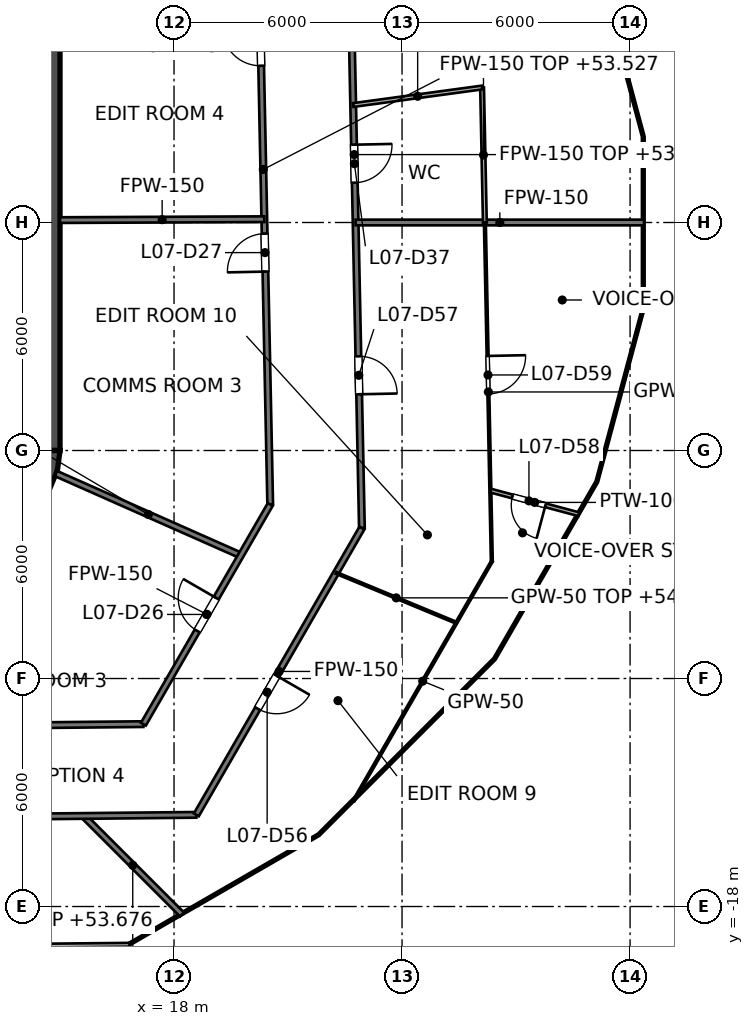
"""IFC4 building model, lengths in metres.
Left out: names, types, materials, properties, quantities, classifications, styles, units other than length and angle.
Written with IfcOpenShell. Run it as: python <this file> out.ifc"""

import sys

from ifc_helpers import new_model, si_unit, direction, frame, frame_2d, origin, place, context, subcontext, project, spatial, polyline, rectangle, outline, extrude, element, fill, save


model = new_model("IFC4")
c1 = context("Model", 3, precision=1e-05, world=origin(), true_north=direction((0.0, 1.0)))
c2 = subcontext(c1, "Body", "Model", "MODEL_VIEW")
j1 = project(units=[si_unit("LENGTHUNIT", "METRE"), si_unit("PLANEANGLEUNIT", "RADIAN")], contexts=[c1])
p1 = place(None, origin())
s1 = spatial("IfcSite", under=j1, at=p1, CompositionType="ELEMENT")
p2 = place(p1, origin())
s2 = spatial("IfcBuilding", under=s1, at=p2, CompositionType="ELEMENT")
p3 = place(p2, frame((0.0, 0.0, 50.4)))
s3 = spatial("IfcBuildingStorey", under=s2, at=p3, CompositionType="ELEMENT", Elevation=50.4)
p4 = place(p3, frame((14.7, -6.0, 0.0), z_axis=(0.0, 0.0, 1.0), x_axis=(0.0, 1.0, 0.0)))
e1 = element("IfcWall", 1, at=p4, inside=s3, PredefinedType="SHEAR", context=c2, shape_type="SweptSolid", body=[
    extrude(rectangle(XDim=12.0, YDim=0.6, at=frame_2d((6.0, 0.0))), origin(), (0.0, 0.0, 1.0), 4.2),
])
p5 = place(p3, origin())
e2 = element("IfcWall", 2, at=p5, inside=s3, PredefinedType="SHEAR", context=c2, shape_type="SweptSolid", body=[
    extrude(outline(polyline([(15.0, -6.0), (14.395, -6.0), (14.347, -6.361), (14.208, -6.698), (13.986, -6.986), (13.698, -7.208), (13.361, -7.347), (13.0, -7.395), (13.0, -8.0), (13.518, -7.932), (14.0, -7.732), (14.414, -7.414), (14.732, -7.0), (14.932, -6.518), (15.0, -6.0)])), origin(), (0.0, 0.0, 1.0), 4.2),
])
p6 = place(p3, frame((20.167, 10.213, 0.0), z_axis=(0.0, 0.0, 1.0), x_axis=(0.020624730832, -0.999787287616, 0.0)))
e3 = element("IfcWall", 3, at=p6, inside=s3, PredefinedType="PARTITIONING", context=c2, shape_type="SweptSolid", body=[
    extrude(rectangle(XDim=17.637, YDim=0.15, at=frame_2d((8.819, 0.0))), origin(), (0.0, 0.0, 1.0), 3.127),
])
p7 = place(p6, frame((10.508, 0.0, 0.0)))
e4 = element("IfcOpeningElement", 4, at=p7, cuts=e3, PredefinedType="OPENING", context=c2, shape_type="SweptSolid", body=[
    extrude(rectangle(XDim=1.0, YDim=2.1, at=frame_2d((0.5, 1.05))), frame((0.0, 0.075, 0.0), z_axis=(0.0, -1.0, 0.0), x_axis=(1.0, 0.0, 0.0)), (0.0, 0.0, 1.0), 0.15),
])
p8 = place(p6, frame((5.089, 0.0, 0.0)))
e5 = element("IfcOpeningElement", 5, at=p8, cuts=e3, PredefinedType="OPENING", context=c2, shape_type="SweptSolid", body=[
    extrude(rectangle(XDim=1.0, YDim=2.1, at=frame_2d((0.5, 1.05))), frame((0.0, 0.075, 0.0), z_axis=(0.0, -1.0, 0.0), x_axis=(1.0, 0.0, 0.0)), (0.0, 0.0, 1.0), 0.15),
])
p9 = place(p3, frame((22.539, 11.615, 0.0), z_axis=(0.0, 0.0, 1.0), x_axis=(0.020613919434, -0.999787510587, 0.0)))
e6 = element("IfcWall", 6, at=p9, inside=s3, PredefinedType="PARTITIONING", context=c2, shape_type="SweptSolid", body=[
    extrude(rectangle(XDim=19.66, YDim=0.15, at=frame_2d((9.83, 0.0))), origin(), (0.0, 0.0, 1.0), 3.127),
])
p10 = place(p9, frame((9.57, 0.0, 0.0)))
e7 = element("IfcOpeningElement", 7, at=p10, cuts=e6, PredefinedType="OPENING", context=c2, shape_type="SweptSolid", body=[
    extrude(rectangle(XDim=1.0, YDim=2.1, at=frame_2d((0.5, 1.05))), frame((0.0, 0.075, 0.0), z_axis=(0.0, -1.0, 0.0), x_axis=(1.0, 0.0, 0.0)), (0.0, 0.0, 1.0), 0.15),
])
p11 = place(p9, frame((15.139, 0.0, 0.0)))
e8 = element("IfcOpeningElement", 8, at=p11, cuts=e6, PredefinedType="OPENING", context=c2, shape_type="SweptSolid", body=[
    extrude(rectangle(XDim=1.0, YDim=2.1, at=frame_2d((0.5, 1.05))), frame((0.0, 0.075, 0.0), z_axis=(0.0, -1.0, 0.0), x_axis=(1.0, 0.0, 0.0)), (0.0, 0.0, 1.0), 0.15),
])
p12 = place(p3, frame((15.617, -15.617, 0.0), z_axis=(0.0, 0.0, 1.0), x_axis=(0.707106781187, -0.707106781187, 0.0)))
e9 = element("IfcWall", 9, at=p12, inside=s3, PredefinedType="PARTITIONING", context=c2, shape_type="SweptSolid", body=[
    extrude(rectangle(XDim=3.667, YDim=0.15, at=frame_2d((1.833, 0.0))), origin(), (0.0, 0.0, 1.0), 3.276),
])
p13 = place(p3, frame((14.895, -6.607, 0.0), z_axis=(0.0, 0.0, 1.0), x_axis=(0.914233271379, -0.405188259337, 0.0)))
e10 = element("IfcWall", 10, at=p13, inside=s3, PredefinedType="PARTITIONING", context=c2, shape_type="SweptSolid", body=[
    extrude(rectangle(XDim=5.317, YDim=0.15, at=frame_2d((2.659, 0.0))), origin(), (0.0, 0.0, 1.0), 3.276),
])
p14 = place(p3, frame((22.778, 0.0, 0.0), z_axis=(0.0, 0.0, 1.0), x_axis=(1.0, 0.0, 0.0)))
e11 = element("IfcWall", 11, at=p14, inside=s3, PredefinedType="PARTITIONING", context=c2, shape_type="SweptSolid", body=[
    extrude(rectangle(XDim=7.589, YDim=0.15, at=frame_2d((3.794, 0.0))), origin(), (0.0, 0.0, 1.0), 3.195),
])
p15 = place(p3, frame((15.0, 0.063, 0.0), z_axis=(0.0, 0.0, 1.0), x_axis=(0.999990294223, 0.004405843865, 0.0)))
e12 = element("IfcWall", 12, at=p15, inside=s3, PredefinedType="PARTITIONING", context=c2, shape_type="SweptSolid", body=[
    extrude(rectangle(XDim=5.375, YDim=0.15, at=frame_2d((2.688, 0.0))), origin(), (0.0, 0.0, 1.0), 3.195),
])
p16 = place(p3, frame((-14.534, -15.916, 0.0), z_axis=(0.0, 0.0, 1.0), x_axis=(0.99995085722, 0.009913785652, 0.0)))
e13 = element("IfcWall", 13, at=p16, inside=s3, PredefinedType="PARTITIONING", context=c2, shape_type="SweptSolid", body=[
    extrude(rectangle(XDim=33.123, YDim=0.15, at=frame_2d((16.561, 0.0))), origin(), (0.0, 0.0, 1.0), 3.127),
])
p17 = place(p16, frame((3.611, 0.0, 0.0)))
e14 = element("IfcOpeningElement", 14, at=p17, cuts=e13, PredefinedType="OPENING", context=c2, shape_type="SweptSolid", body=[
    extrude(rectangle(XDim=1.0, YDim=2.1, at=frame_2d((0.5, 1.05))), frame((0.0, 0.075, 0.0), z_axis=(0.0, -1.0, 0.0), x_axis=(1.0, 0.0, 0.0)), (0.0, 0.0, 1.0), 0.15),
])
p18 = place(p16, frame((10.927, 0.0, 0.0)))
e15 = element("IfcOpeningElement", 15, at=p18, cuts=e13, PredefinedType="OPENING", context=c2, shape_type="SweptSolid", body=[
    extrude(rectangle(XDim=1.0, YDim=2.1, at=frame_2d((0.5, 1.05))), frame((0.0, 0.075, 0.0), z_axis=(0.0, -1.0, 0.0), x_axis=(1.0, 0.0, 0.0)), (0.0, 0.0, 1.0), 0.15),
])
p19 = place(p16, frame((16.11, 0.0, 0.0)))
e16 = element("IfcOpeningElement", 16, at=p19, cuts=e13, PredefinedType="OPENING", context=c2, shape_type="SweptSolid", body=[
    extrude(rectangle(XDim=1.0, YDim=2.1, at=frame_2d((0.5, 1.05))), frame((0.0, 0.075, 0.0), z_axis=(0.0, -1.0, 0.0), x_axis=(1.0, 0.0, 0.0)), (0.0, 0.0, 1.0), 0.15),
])
p20 = place(p16, frame((19.56, 0.0, 0.0)))
e17 = element("IfcOpeningElement", 17, at=p20, cuts=e13, PredefinedType="OPENING", context=c2, shape_type="SweptSolid", body=[
    extrude(rectangle(XDim=1.0, YDim=2.1, at=frame_2d((0.5, 1.05))), frame((0.0, 0.075, 0.0), z_axis=(0.0, -1.0, 0.0), x_axis=(1.0, 0.0, 0.0)), (0.0, 0.0, 1.0), 0.15),
])
p21 = place(p16, frame((25.623, 0.0, 0.0)))
e18 = element("IfcOpeningElement", 18, at=p21, cuts=e13, PredefinedType="OPENING", context=c2, shape_type="SweptSolid", body=[
    extrude(rectangle(XDim=1.0, YDim=2.1, at=frame_2d((0.5, 1.05))), frame((0.0, 0.075, 0.0), z_axis=(0.0, -1.0, 0.0), x_axis=(1.0, 0.0, 0.0)), (0.0, 0.0, 1.0), 0.15),
])
p22 = place(p3, frame((11.9, -13.253, 0.0), z_axis=(0.0, 0.0, 1.0), x_axis=(0.999950853109, 0.009914200296, 0.0)))
e19 = element("IfcWall", 19, at=p22, inside=s3, PredefinedType="PARTITIONING", context=c2, shape_type="SweptSolid", body=[
    extrude(rectangle(XDim=5.294, YDim=0.15, at=frame_2d((2.647, 0.0))), origin(), (0.0, 0.0, 1.0), 3.276),
])
p23 = place(p3, frame((18.587, -15.587, 0.0), z_axis=(0.0, 0.0, 1.0), x_axis=(0.500026433136, 0.866010142069, 0.0)))
e20 = element("IfcWall", 20, at=p23, inside=s3, PredefinedType="PARTITIONING", context=c2, shape_type="SweptSolid", body=[
    extrude(rectangle(XDim=8.713, YDim=0.15, at=frame_2d((4.357, 0.0))), origin(), (0.0, 0.0, 1.0), 3.195),
])
p24 = place(p23, frame((3.226, 0.0, 0.0)))
e21 = element("IfcOpeningElement", 21, at=p24, cuts=e20, PredefinedType="OPENING", context=c2, shape_type="SweptSolid", body=[
    extrude(rectangle(XDim=1.0, YDim=2.1, at=frame_2d((0.5, 1.05))), frame((0.0, 0.075, 0.0), z_axis=(0.0, -1.0, 0.0), x_axis=(1.0, 0.0, 0.0)), (0.0, 0.0, 1.0), 0.15),
])
p25 = place(p3, frame((17.194, -13.201, 0.0), z_axis=(0.0, 0.0, 1.0), x_axis=(0.50001062018, 0.866019272134, 0.0)))
e22 = element("IfcWall", 22, at=p25, inside=s3, PredefinedType="PARTITIONING", context=c2, shape_type="SweptSolid", body=[
    extrude(rectangle(XDim=6.674, YDim=0.15, at=frame_2d((3.337, 0.0))), origin(), (0.0, 0.0, 1.0), 3.195),
])
p26 = place(p25, frame((2.833, 0.0, 0.0)))
e23 = element("IfcOpeningElement", 23, at=p26, cuts=e22, PredefinedType="OPENING", context=c2, shape_type="SweptSolid", body=[
    extrude(rectangle(XDim=1.0, YDim=2.1, at=frame_2d((0.5, 1.05))), frame((0.0, 0.075, 0.0), z_axis=(0.0, -1.0, 0.0), x_axis=(1.0, 0.0, 0.0)), (0.0, 0.0, 1.0), 0.15),
])
p27 = place(p3, frame((26.179, 0.0, 0.0), z_axis=(0.0, 0.0, 1.0), x_axis=(0.020525621248, -0.999789327245, 0.0)))
e24 = element("IfcWall", 24, at=p27, inside=s3, PredefinedType="PARTITIONING", context=c2, shape_type="SweptSolid", body=[
    extrude(rectangle(XDim=8.921, YDim=0.05, at=frame_2d((4.46, 0.0))), origin(), (0.0, 0.0, 1.0), 3.127),
])
p28 = place(p27, frame((3.513, 0.0, 0.0)))
e25 = element("IfcOpeningElement", 25, at=p28, cuts=e24, PredefinedType="OPENING", context=c2, shape_type="SweptSolid", body=[
    extrude(rectangle(XDim=1.0, YDim=2.1, at=frame_2d((0.5, 1.05))), frame((0.0, 0.025, 0.0), z_axis=(0.0, -1.0, 0.0), x_axis=(1.0, 0.0, 0.0)), (0.0, 0.0, 1.0), 0.05),
])
p29 = place(p3, frame((22.263, -9.221, 0.0), z_axis=(0.0, 0.0, 1.0), x_axis=(0.923799852488, -0.382875740342, 0.0)))
e26 = element("IfcWall", 26, at=p29, inside=s3, PredefinedType="PARTITIONING", context=c2, shape_type="SweptSolid", body=[
    extrude(rectangle(XDim=3.429, YDim=0.05, at=frame_2d((1.715, 0.0))), origin(), (0.0, 0.0, 1.0), 4.05),
])
p30 = place(p3, frame((22.725, -15.22, 0.0), z_axis=(0.0, 0.0, 1.0), x_axis=(0.49993933643, 0.86606042508, 0.0)))
e27 = element("IfcWall", 27, at=p30, inside=s3, PredefinedType="PARTITIONING", context=c2, shape_type="SweptSolid", body=[
    extrude(rectangle(XDim=7.276, YDim=0.05, at=frame_2d((3.638, 0.0))), origin(), (0.0, 0.0, 1.0), 3.276),
])
p31 = place(p3, frame((26.106, 3.552, 0.0), z_axis=(0.0, 0.0, 1.0), x_axis=(0.020546902065, -0.999788890124, 0.0)))
e28 = element("IfcWall", 28, at=p31, inside=s3, PredefinedType="PARTITIONING", context=c2, shape_type="SweptSolid", body=[
    extrude(rectangle(XDim=3.553, YDim=0.1, at=frame_2d((1.776, 0.0))), origin(), (0.0, 0.0, 1.0), 3.127),
])
p32 = place(p3, frame((26.325, -7.054, 0.0), z_axis=(0.0, 0.0, 1.0), x_axis=(0.965931782, -0.258796817064, 0.0)))
e29 = element("IfcWall", 29, at=p32, inside=s3, PredefinedType="PARTITIONING", context=c2, shape_type="SweptSolid", body=[
    extrude(rectangle(XDim=2.411, YDim=0.1, at=frame_2d((1.206, 0.0))), origin(), (0.0, 0.0, 1.0), 3.727),
])
p33 = place(p32, frame((0.6, 0.0, 0.0)))
e30 = element("IfcOpeningElement", 30, at=p33, cuts=e29, PredefinedType="OPENING", context=c2, shape_type="SweptSolid", body=[
    extrude(rectangle(XDim=0.9, YDim=2.1, at=frame_2d((0.45, 1.05))), frame((0.0, 0.05, 0.0), z_axis=(0.0, -1.0, 0.0), x_axis=(1.0, 0.0, 0.0)), (0.0, 0.0, 1.0), 0.1),
])
p34 = place(p3, frame((-15.194, -19.323, 0.0), z_axis=(0.0, 0.0, 1.0), x_axis=(0.999951203002, 0.009878846795, 0.0)))
e31 = element("IfcWall", 31, at=p34, inside=s3, PredefinedType="PARTITIONING", context=c2, shape_type="SweptSolid", body=[
    extrude(rectangle(XDim=32.029, YDim=0.1, at=frame_2d((16.014, 0.0))), origin(), (0.0, 0.0, 1.0), 3.127),
])
p35 = place(p34, frame((6.542, 0.0, 0.0)))
e32 = element("IfcOpeningElement", 32, at=p35, cuts=e31, PredefinedType="OPENING", context=c2, shape_type="SweptSolid", body=[
    extrude(rectangle(XDim=0.9, YDim=2.1, at=frame_2d((0.45, 1.05))), frame((0.0, 0.05, 0.0), z_axis=(0.0, -1.0, 0.0), x_axis=(1.0, 0.0, 0.0)), (0.0, 0.0, 1.0), 0.1),
])
p36 = place(p34, frame((25.588, 0.0, 0.0)))
e33 = element("IfcOpeningElement", 33, at=p36, cuts=e31, PredefinedType="OPENING", context=c2, shape_type="SweptSolid", body=[
    extrude(rectangle(XDim=0.9, YDim=2.1, at=frame_2d((0.45, 1.05))), frame((0.0, 0.05, 0.0), z_axis=(0.0, -1.0, 0.0), x_axis=(1.0, 0.0, 0.0)), (0.0, 0.0, 1.0), 0.1),
])
p37 = place(p3, frame((22.715, 3.091, 0.0), z_axis=(0.0, 0.0, 1.0), x_axis=(0.990886952304, 0.134696131179, 0.0)))
e34 = element("IfcWall", 34, at=p37, inside=s3, PredefinedType="PARTITIONING", context=c2, shape_type="SweptSolid", body=[
    extrude(rectangle(XDim=3.422, YDim=0.1, at=frame_2d((1.711, 0.0))), origin(), (0.0, 0.0, 1.0), 4.05),
])
p38 = place(p26, origin())
e35 = element("IfcDoor", 35, at=p38, inside=s3, OperationType="SINGLE_SWING_RIGHT", PredefinedType="DOOR", context=c2, shape_type="SweptSolid", body=[
    extrude(rectangle(XDim=1.0, YDim=2.1, at=frame_2d((0.5, 1.05))), frame((0.0, 0.025, 0.0), z_axis=(0.0, -1.0, 0.0), x_axis=(1.0, 0.0, 0.0)), (0.0, 0.0, 1.0), 0.05),
])
fill(e23, e35)
p39 = place(p7, origin())
e36 = element("IfcDoor", 36, at=p39, inside=s3, OperationType="SINGLE_SWING_RIGHT", PredefinedType="DOOR", context=c2, shape_type="SweptSolid", body=[
    extrude(rectangle(XDim=1.0, YDim=2.1, at=frame_2d((0.5, 1.05))), frame((0.0, 0.025, 0.0), z_axis=(0.0, -1.0, 0.0), x_axis=(1.0, 0.0, 0.0)), (0.0, 0.0, 1.0), 0.05),
])
fill(e4, e36)
p40 = place(p8, origin())
e37 = element("IfcDoor", 37, at=p40, inside=s3, OperationType="SINGLE_SWING_LEFT", PredefinedType="DOOR", context=c2, shape_type="SweptSolid", body=[
    extrude(rectangle(XDim=1.0, YDim=2.1, at=frame_2d((0.5, 1.05))), frame((0.0, 0.025, 0.0), z_axis=(0.0, -1.0, 0.0), x_axis=(1.0, 0.0, 0.0)), (0.0, 0.0, 1.0), 0.05),
])
fill(e5, e37)
p41 = place(p10, origin())
e38 = element("IfcDoor", 38, at=p41, inside=s3, OperationType="SINGLE_SWING_LEFT", PredefinedType="DOOR", context=c2, shape_type="SweptSolid", body=[
    extrude(rectangle(XDim=1.0, YDim=2.1, at=frame_2d((0.5, 1.05))), frame((0.0, 0.025, 0.0), z_axis=(0.0, -1.0, 0.0), x_axis=(1.0, 0.0, 0.0)), (0.0, 0.0, 1.0), 0.05),
])
fill(e7, e38)
p42 = place(p24, origin())
e39 = element("IfcDoor", 39, at=p42, inside=s3, OperationType="SINGLE_SWING_RIGHT", PredefinedType="DOOR", context=c2, shape_type="SweptSolid", body=[
    extrude(rectangle(XDim=1.0, YDim=2.1, at=frame_2d((0.5, 1.05))), frame((0.0, 0.025, 0.0), z_axis=(0.0, -1.0, 0.0), x_axis=(1.0, 0.0, 0.0)), (0.0, 0.0, 1.0), 0.05),
])
fill(e21, e39)
p43 = place(p11, origin())
e40 = element("IfcDoor", 40, at=p43, inside=s3, OperationType="SINGLE_SWING_RIGHT", PredefinedType="DOOR", context=c2, shape_type="SweptSolid", body=[
    extrude(rectangle(XDim=1.0, YDim=2.1, at=frame_2d((0.5, 1.05))), frame((0.0, 0.025, 0.0), z_axis=(0.0, -1.0, 0.0), x_axis=(1.0, 0.0, 0.0)), (0.0, 0.0, 1.0), 0.05),
])
fill(e8, e40)
p44 = place(p33, origin())
e41 = element("IfcDoor", 41, at=p44, inside=s3, OperationType="SINGLE_SWING_RIGHT", PredefinedType="DOOR", context=c2, shape_type="SweptSolid", body=[
    extrude(rectangle(XDim=0.9, YDim=2.1, at=frame_2d((0.45, 1.05))), frame((0.0, 0.025, 0.0), z_axis=(0.0, -1.0, 0.0), x_axis=(1.0, 0.0, 0.0)), (0.0, 0.0, 1.0), 0.05),
])
fill(e30, e41)
p45 = place(p28, origin())
e42 = element("IfcDoor", 42, at=p45, inside=s3, OperationType="SINGLE_SWING_LEFT", PredefinedType="DOOR", context=c2, shape_type="SweptSolid", body=[
    extrude(rectangle(XDim=1.0, YDim=2.1, at=frame_2d((0.5, 1.05))), frame((0.0, 0.025, 0.0), z_axis=(0.0, -1.0, 0.0), x_axis=(1.0, 0.0, 0.0)), (0.0, 0.0, 1.0), 0.05),
])
fill(e25, e42)
save(model, sys.argv[1])
